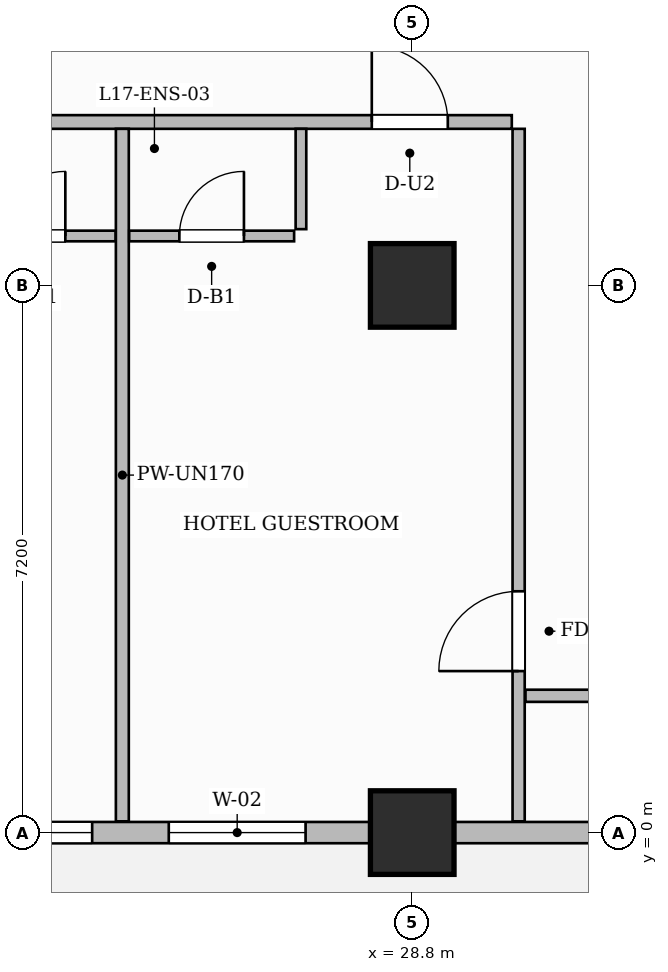
"""IFC4 building model, lengths in metres.
Left out: names, types, materials, properties, quantities, classifications, styles, units other than length and angle.
Written with IfcOpenShell. Run it as: python <this file> out.ifc"""

import sys

from ifc_helpers import new_model, si_unit, direction, frame, frame_2d, origin, origin_2d, place, context, subcontext, project, spatial, rectangle, extrude, source, transform, mapped, element, fill, save


model = new_model("IFC4")
c1 = context("Model", 3, precision=1e-05, world=origin(), true_north=direction((0.0, 1.0)))
c2 = subcontext(c1, "Body", "Model", "MODEL_VIEW")
j1 = project(units=[si_unit("LENGTHUNIT", "METRE"), si_unit("PLANEANGLEUNIT", "RADIAN")], contexts=[c1])
p1 = place(None, origin())
s1 = spatial("IfcSite", under=j1, at=p1, CompositionType="ELEMENT")
p2 = place(p1, origin())
s2 = spatial("IfcBuilding", under=s1, at=p2, CompositionType="ELEMENT")
p3 = place(p2, frame((0.0, 0.0, 73.1)))
s3 = spatial("IfcBuildingStorey", under=s2, at=p3, CompositionType="ELEMENT", Elevation=73.1)
m1 = source(origin(), c2, "Body", "SweptSolid", [
    extrude(rectangle(XDim=1.1, YDim=1.1, at=origin_2d()), origin(), (0.0, 0.0, 1.0), 3.7),
])
for number, where, z_axis, x_axis in (
    (1, (28.8, 0.0, 0.0), (0.0, 0.0, 1.0), (1.0, 0.0, 0.0)),
    (2, (28.8, 7.2, 0.0), (0.0, 0.0, 1.0), (1.0, 0.0, 0.0)),
):
    element("IfcColumn", number, at=place(p3, frame(where, z_axis=z_axis, x_axis=x_axis)), inside=s3, PredefinedType="COLUMN", context=c2, shape_type="MappedRepresentation", body=[
        mapped(m1, transform((0.0, 0.0, 0.0), scale=1.0)),
    ])
p4 = place(p3, frame((14.548, 9.35, 0.0), z_axis=(0.0, 0.0, 1.0), x_axis=(1.0, 0.0, 0.0)))
e3 = element("IfcWall", 3, at=p4, inside=s3, PredefinedType="PARTITIONING", context=c2, shape_type="SweptSolid", body=[
    extrude(rectangle(XDim=15.562, YDim=0.18, at=frame_2d((7.781, 0.0))), origin(), (0.0, 0.0, 1.0), 3.45),
])
p5 = place(p4, frame((2.908, 0.0, 0.0)))
e4 = element("IfcOpeningElement", 4, at=p5, cuts=e3, PredefinedType="OPENING", context=c2, shape_type="SweptSolid", body=[
    extrude(rectangle(XDim=1.0, YDim=2.2, at=frame_2d((0.5, 1.1))), frame((0.0, 0.1, 0.0), z_axis=(0.0, -1.0, 0.0), x_axis=(1.0, 0.0, 0.0)), (0.0, 0.0, 1.0), 0.2),
])
p6 = place(p4, frame((5.985, 0.0, 0.0)))
e5 = element("IfcOpeningElement", 5, at=p6, cuts=e3, PredefinedType="OPENING", context=c2, shape_type="SweptSolid", body=[
    extrude(rectangle(XDim=1.05, YDim=2.25, at=frame_2d((0.525, 1.125))), frame((0.0, 0.1, 0.0), z_axis=(0.0, -1.0, 0.0), x_axis=(1.0, 0.0, 0.0)), (0.0, 0.0, 1.0), 0.2),
])
p7 = place(p4, frame((13.72, 0.0, 0.0)))
e6 = element("IfcOpeningElement", 6, at=p7, cuts=e3, PredefinedType="OPENING", context=c2, shape_type="SweptSolid", body=[
    extrude(rectangle(XDim=1.0, YDim=2.2, at=frame_2d((0.5, 1.1))), frame((0.0, 0.1, 0.0), z_axis=(0.0, -1.0, 0.0), x_axis=(1.0, 0.0, 0.0)), (0.0, 0.0, 1.0), 0.2),
])
p8 = place(p3, frame((30.2, 0.148, 0.0), z_axis=(0.0, 0.0, 1.0), x_axis=(0.0, 1.0, 0.0)))
e7 = element("IfcWall", 7, at=p8, inside=s3, PredefinedType="PARTITIONING", context=c2, shape_type="SweptSolid", body=[
    extrude(rectangle(XDim=9.112, YDim=0.16, at=frame_2d((4.556, 0.0))), origin(), (0.0, 0.0, 1.0), 3.45),
])
p9 = place(p8, frame((1.977, 0.0, 0.0)))
e8 = element("IfcOpeningElement", 8, at=p9, cuts=e7, PredefinedType="OPENING", context=c2, shape_type="SweptSolid", body=[
    extrude(rectangle(XDim=1.05, YDim=2.15, at=frame_2d((0.525, 1.075))), frame((0.0, 0.09, 0.0), z_axis=(0.0, -1.0, 0.0), x_axis=(1.0, 0.0, 0.0)), (0.0, 0.0, 1.0), 0.18),
])
p10 = place(p3, frame((30.29, 1.8, 0.0), z_axis=(0.0, 0.0, 1.0), x_axis=(1.0, 0.0, 0.0)))
e9 = element("IfcWall", 9, at=p10, inside=s3, PredefinedType="PARTITIONING", context=c2, shape_type="SweptSolid", body=[
    extrude(rectangle(XDim=19.37, YDim=0.16, at=frame_2d((9.685, 0.0))), origin(), (0.0, 0.0, 1.0), 3.45),
])
p11 = place(p10, frame((2.916, 0.0, 0.0)))
e10 = element("IfcOpeningElement", 10, at=p11, cuts=e9, PredefinedType="OPENING", context=c2, shape_type="SweptSolid", body=[
    extrude(rectangle(XDim=0.9, YDim=2.15, at=frame_2d((0.45, 1.075))), frame((0.0, 0.09, 0.0), z_axis=(0.0, -1.0, 0.0), x_axis=(1.0, 0.0, 0.0)), (0.0, 0.0, 1.0), 0.18),
])
p12 = place(p10, frame((9.66, 0.0, 0.0)))
e11 = element("IfcOpeningElement", 11, at=p12, cuts=e9, PredefinedType="OPENING", context=c2, shape_type="SweptSolid", body=[
    extrude(rectangle(XDim=0.9, YDim=2.15, at=frame_2d((0.45, 1.075))), frame((0.0, 0.09, 0.0), z_axis=(0.0, -1.0, 0.0), x_axis=(1.0, 0.0, 0.0)), (0.0, 0.0, 1.0), 0.18),
])
p13 = place(p10, frame((15.86, 0.0, 0.0)))
e12 = element("IfcOpeningElement", 12, at=p13, cuts=e9, PredefinedType="OPENING", context=c2, shape_type="SweptSolid", body=[
    extrude(rectangle(XDim=0.9, YDim=2.15, at=frame_2d((0.45, 1.075))), frame((0.0, 0.09, 0.0), z_axis=(0.0, -1.0, 0.0), x_axis=(1.0, 0.0, 0.0)), (0.0, 0.0, 1.0), 0.18),
])
p14 = place(p3, frame((24.986, 0.148, 0.0), z_axis=(0.0, 0.0, 1.0), x_axis=(0.0, 1.0, 0.0)))
e13 = element("IfcWall", 13, at=p14, inside=s3, PredefinedType="PARTITIONING", context=c2, shape_type="SweptSolid", body=[
    extrude(rectangle(XDim=9.112, YDim=0.17, at=frame_2d((4.556, 0.0))), origin(), (0.0, 0.0, 1.0), 3.075),
])
p15 = place(p3, frame((22.726, 7.85, 0.0), z_axis=(0.0, 0.0, 1.0), x_axis=(1.0, 0.0, 0.0)))
e14 = element("IfcWall", 14, at=p15, inside=s3, PredefinedType="PARTITIONING", context=c2, shape_type="SweptSolid", body=[
    extrude(rectangle(XDim=2.17, YDim=0.14, at=frame_2d((1.085, 0.0))), origin(), (0.0, 0.0, 1.0), 3.45),
])
p16 = place(p15, frame((0.66, 0.0, 0.0)))
e15 = element("IfcOpeningElement", 15, at=p16, cuts=e14, PredefinedType="OPENING", context=c2, shape_type="SweptSolid", body=[
    extrude(rectangle(XDim=0.85, YDim=2.1, at=frame_2d((0.425, 1.05))), frame((0.0, 0.08, 0.0), z_axis=(0.0, -1.0, 0.0), x_axis=(1.0, 0.0, 0.0)), (0.0, 0.0, 1.0), 0.16),
])
p17 = place(p3, frame((27.336, 7.94, 0.0), z_axis=(0.0, 0.0, 1.0), x_axis=(0.0, 1.0, 0.0)))
e16 = element("IfcWall", 16, at=p17, inside=s3, PredefinedType="PARTITIONING", context=c2, shape_type="SweptSolid", body=[
    extrude(rectangle(XDim=1.32, YDim=0.14, at=frame_2d((0.66, 0.0))), origin(), (0.0, 0.0, 1.0), 3.45),
])
p18 = place(p3, frame((25.076, 7.85, 0.0), z_axis=(0.0, 0.0, 1.0), x_axis=(1.0, 0.0, 0.0)))
e17 = element("IfcWall", 17, at=p18, inside=s3, PredefinedType="PARTITIONING", context=c2, shape_type="SweptSolid", body=[
    extrude(rectangle(XDim=2.17, YDim=0.14, at=frame_2d((1.085, 0.0))), origin(), (0.0, 0.0, 1.0), 3.45),
])
p19 = place(p18, frame((0.66, 0.0, 0.0)))
e18 = element("IfcOpeningElement", 18, at=p19, cuts=e17, PredefinedType="OPENING", context=c2, shape_type="SweptSolid", body=[
    extrude(rectangle(XDim=0.85, YDim=2.1, at=frame_2d((0.425, 1.05))), frame((0.0, 0.08, 0.0), z_axis=(0.0, -1.0, 0.0), x_axis=(1.0, 0.0, 0.0)), (0.0, 0.0, 1.0), 0.16),
])
p20 = place(p3, frame((14.4, 0.0, 0.0), z_axis=(0.0, 0.0, 1.0), x_axis=(1.0, 0.0, 0.0)))
e19 = element("IfcWall", 19, at=p20, inside=s3, PredefinedType="SOLIDWALL", context=c2, shape_type="SweptSolid", body=[
    extrude(rectangle(XDim=43.2, YDim=0.28, at=frame_2d((21.6, 0.0))), origin(), (0.0, 0.0, 1.0), 2.885),
])
p21 = place(p20, frame((0.85, 0.0, 0.0)))
e20 = element("IfcOpeningElement", 20, at=p21, cuts=e19, PredefinedType="OPENING", context=c2, shape_type="SweptSolid", body=[
    extrude(rectangle(XDim=1.2, YDim=2.2, at=frame_2d((0.6, 1.1))), frame((0.0, 0.15, 0.0), z_axis=(0.0, -1.0, 0.0), x_axis=(1.0, 0.0, 0.0)), (0.0, 0.0, 1.0), 0.3),
])
p22 = place(p20, frame((2.811, 0.0, 0.8)))
e21 = element("IfcOpeningElement", 21, at=p22, cuts=e19, PredefinedType="OPENING", context=c2, shape_type="SweptSolid", body=[
    extrude(rectangle(XDim=1.8, YDim=1.85, at=frame_2d((0.9, 0.925))), frame((0.0, 0.15, 0.0), z_axis=(0.0, -1.0, 0.0), x_axis=(1.0, 0.0, 0.0)), (0.0, 0.0, 1.0), 0.3),
])
p23 = place(p20, frame((5.269, 0.0, 0.8)))
e22 = element("IfcOpeningElement", 22, at=p23, cuts=e19, PredefinedType="OPENING", context=c2, shape_type="SweptSolid", body=[
    extrude(rectangle(XDim=0.95, YDim=1.75, at=frame_2d((0.475, 0.875))), frame((0.0, 0.15, 0.0), z_axis=(0.0, -1.0, 0.0), x_axis=(1.0, 0.0, 0.0)), (0.0, 0.0, 1.0), 0.3),
])
p24 = place(p20, frame((8.389, 0.0, 0.8)))
e23 = element("IfcOpeningElement", 23, at=p24, cuts=e19, PredefinedType="OPENING", context=c2, shape_type="SweptSolid", body=[
    extrude(rectangle(XDim=1.8, YDim=1.85, at=frame_2d((0.9, 0.925))), frame((0.0, 0.15, 0.0), z_axis=(0.0, -1.0, 0.0), x_axis=(1.0, 0.0, 0.0)), (0.0, 0.0, 1.0), 0.3),
])
p25 = place(p20, frame((11.197, 0.0, 0.8)))
e24 = element("IfcOpeningElement", 24, at=p25, cuts=e19, PredefinedType="OPENING", context=c2, shape_type="SweptSolid", body=[
    extrude(rectangle(XDim=1.8, YDim=1.85, at=frame_2d((0.9, 0.925))), frame((0.0, 0.15, 0.0), z_axis=(0.0, -1.0, 0.0), x_axis=(1.0, 0.0, 0.0)), (0.0, 0.0, 1.0), 0.3),
])
p26 = place(p20, frame((16.804, 0.0, 0.8)))
e25 = element("IfcOpeningElement", 25, at=p26, cuts=e19, PredefinedType="OPENING", context=c2, shape_type="SweptSolid", body=[
    extrude(rectangle(XDim=1.8, YDim=1.85, at=frame_2d((0.9, 0.925))), frame((0.0, 0.15, 0.0), z_axis=(0.0, -1.0, 0.0), x_axis=(1.0, 0.0, 0.0)), (0.0, 0.0, 1.0), 0.3),
])
p27 = place(p20, frame((21.521, 0.0, 0.8)))
e26 = element("IfcOpeningElement", 26, at=p27, cuts=e19, PredefinedType="OPENING", context=c2, shape_type="SweptSolid", body=[
    extrude(rectangle(XDim=0.95, YDim=1.75, at=frame_2d((0.475, 0.875))), frame((0.0, 0.15, 0.0), z_axis=(0.0, -1.0, 0.0), x_axis=(1.0, 0.0, 0.0)), (0.0, 0.0, 1.0), 0.3),
])
p28 = place(p20, frame((23.904, 0.0, 0.8)))
e27 = element("IfcOpeningElement", 27, at=p28, cuts=e19, PredefinedType="OPENING", context=c2, shape_type="SweptSolid", body=[
    extrude(rectangle(XDim=1.8, YDim=1.85, at=frame_2d((0.9, 0.925))), frame((0.0, 0.15, 0.0), z_axis=(0.0, -1.0, 0.0), x_axis=(1.0, 0.0, 0.0)), (0.0, 0.0, 1.0), 0.3),
])
p29 = place(p20, frame((29.681, 0.0, 0.8)))
e28 = element("IfcOpeningElement", 28, at=p29, cuts=e19, PredefinedType="OPENING", context=c2, shape_type="SweptSolid", body=[
    extrude(rectangle(XDim=1.8, YDim=1.85, at=frame_2d((0.9, 0.925))), frame((0.0, 0.15, 0.0), z_axis=(0.0, -1.0, 0.0), x_axis=(1.0, 0.0, 0.0)), (0.0, 0.0, 1.0), 0.3),
])
p30 = place(p20, frame((32.327, 0.0, 0.8)))
e29 = element("IfcOpeningElement", 29, at=p30, cuts=e19, PredefinedType="OPENING", context=c2, shape_type="SweptSolid", body=[
    extrude(rectangle(XDim=1.8, YDim=1.85, at=frame_2d((0.9, 0.925))), frame((0.0, 0.15, 0.0), z_axis=(0.0, -1.0, 0.0), x_axis=(1.0, 0.0, 0.0)), (0.0, 0.0, 1.0), 0.3),
])
p31 = place(p20, frame((36.875, 0.0, 0.8)))
e30 = element("IfcOpeningElement", 30, at=p31, cuts=e19, PredefinedType="OPENING", context=c2, shape_type="SweptSolid", body=[
    extrude(rectangle(XDim=1.8, YDim=1.85, at=frame_2d((0.9, 0.925))), frame((0.0, 0.15, 0.0), z_axis=(0.0, -1.0, 0.0), x_axis=(1.0, 0.0, 0.0)), (0.0, 0.0, 1.0), 0.3),
])
p32 = place(p20, frame((39.925, 0.0, 0.8)))
e31 = element("IfcOpeningElement", 31, at=p32, cuts=e19, PredefinedType="OPENING", context=c2, shape_type="SweptSolid", body=[
    extrude(rectangle(XDim=1.8, YDim=1.85, at=frame_2d((0.9, 0.925))), frame((0.0, 0.15, 0.0), z_axis=(0.0, -1.0, 0.0), x_axis=(1.0, 0.0, 0.0)), (0.0, 0.0, 1.0), 0.3),
])
m2 = source(origin(), c2, "Body", "SweptSolid", [
    extrude(rectangle(XDim=1.05, YDim=2.15, at=frame_2d((0.525, 1.075))), frame((0.0, 0.025, 0.0), z_axis=(0.0, -1.0, 0.0), x_axis=(1.0, 0.0, 0.0)), (0.0, 0.0, 1.0), 0.05),
])
p33 = place(p9, origin())
e32 = element("IfcDoor", 32, at=p33, inside=s3, OperationType="SINGLE_SWING_LEFT", PredefinedType="DOOR", context=c2, shape_type="MappedRepresentation", body=[
    mapped(m2, transform((0.0, 0.0, 0.0), scale=1.0)),
])
fill(e8, e32)
m3 = source(origin(), c2, "Body", "SweptSolid", [
    extrude(rectangle(XDim=0.85, YDim=2.1, at=frame_2d((0.425, 1.05))), frame((0.0, 0.025, 0.0), z_axis=(0.0, -1.0, 0.0), x_axis=(1.0, 0.0, 0.0)), (0.0, 0.0, 1.0), 0.05),
])
p34 = place(p16, origin())
e33 = element("IfcDoor", 33, at=p34, inside=s3, OperationType="SINGLE_SWING_RIGHT", PredefinedType="DOOR", context=c2, shape_type="MappedRepresentation", body=[
    mapped(m3, transform((0.0, 0.0, 0.0), scale=1.0)),
])
fill(e15, e33)
p35 = place(p19, origin())
e34 = element("IfcDoor", 34, at=p35, inside=s3, OperationType="SINGLE_SWING_RIGHT", PredefinedType="DOOR", context=c2, shape_type="MappedRepresentation", body=[
    mapped(m3, transform((0.0, 0.0, 0.0), scale=1.0)),
])
fill(e18, e34)
m4 = source(origin(), c2, "Body", "SweptSolid", [
    extrude(rectangle(XDim=1.0, YDim=2.2, at=frame_2d((0.5, 1.1))), frame((0.0, 0.025, 0.0), z_axis=(0.0, -1.0, 0.0), x_axis=(1.0, 0.0, 0.0)), (0.0, 0.0, 1.0), 0.05),
])
p36 = place(p7, origin())
e35 = element("IfcDoor", 35, at=p36, inside=s3, OperationType="SINGLE_SWING_LEFT", PredefinedType="DOOR", context=c2, shape_type="MappedRepresentation", body=[
    mapped(m4, transform((0.0, 0.0, 0.0), scale=1.0)),
])
fill(e6, e35)
m5 = source(origin(), c2, "Body", "SweptSolid", [
    extrude(rectangle(XDim=1.8, YDim=1.85, at=frame_2d((0.9, 0.925))), frame((0.0, 0.03, 0.0), z_axis=(0.0, -1.0, 0.0), x_axis=(1.0, 0.0, 0.0)), (0.0, 0.0, 1.0), 0.06),
])
p37 = place(p24, origin())
e36 = element("IfcWindow", 36, at=p37, inside=s3, PartitioningType="DOUBLE_PANEL_VERTICAL", PredefinedType="WINDOW", context=c2, shape_type="MappedRepresentation", body=[
    mapped(m5, transform((0.0, 0.0, 0.0), scale=1.0)),
])
fill(e23, e36)
p38 = place(p25, origin())
e37 = element("IfcWindow", 37, at=p38, inside=s3, PartitioningType="DOUBLE_PANEL_VERTICAL", PredefinedType="WINDOW", context=c2, shape_type="MappedRepresentation", body=[
    mapped(m5, transform((0.0, 0.0, 0.0), scale=1.0)),
])
fill(e24, e37)
save(model, sys.argv[1])
